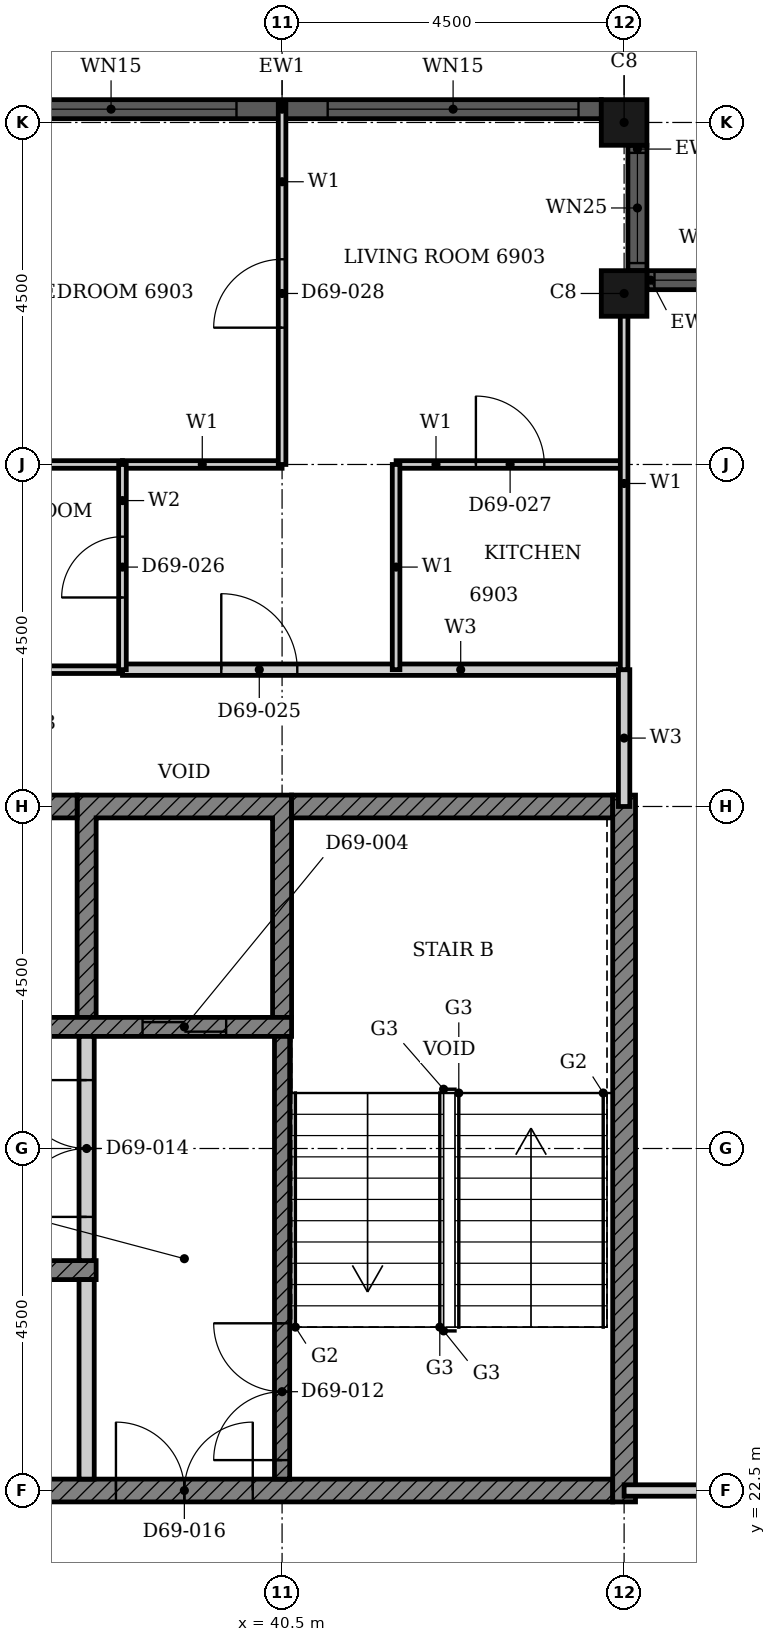
"""IFC4 building model, lengths in metres.
Left out: names, types, materials, properties, quantities, classifications, styles, units other than length and angle.
Written with IfcOpenShell. Run it as: python <this file> out.ifc"""

import sys

from ifc_helpers import new_model, si_unit, direction, frame, frame_2d, origin, origin_2d, place, context, subcontext, project, spatial, polyline, rectangle, hollow_rectangle, outline, extrude, element, fill, save


model = new_model("IFC4")
c1 = context("Model", 3, precision=1e-05, world=origin(), true_north=direction((0.0, 1.0)))
c2 = subcontext(c1, "Body", "Model", "MODEL_VIEW")
j1 = project(units=[si_unit("LENGTHUNIT", "METRE"), si_unit("PLANEANGLEUNIT", "RADIAN")], contexts=[c1])
p1 = place(None, origin())
s1 = spatial("IfcSite", under=j1, at=p1, CompositionType="ELEMENT")
p2 = place(p1, origin())
s2 = spatial("IfcBuilding", under=s1, at=p2, CompositionType="ELEMENT")
p3 = place(p2, frame((0.0, 0.0, 271.2)))
s3 = spatial("IfcBuildingStorey", under=s2, at=p3, CompositionType="ELEMENT", Elevation=271.2)
for number, where, z_axis, x_axis in (
    (1, (45.0, 38.25, 0.0), (0.0, 0.0, 1.0), (1.0, 0.0, 0.0)),
    (2, (45.0, 40.5, 0.0), (0.0, 0.0, 1.0), (1.0, 0.0, 0.0)),
):
    element("IfcColumn", number, at=place(p3, frame(where, z_axis=z_axis, x_axis=x_axis)), inside=s3, PredefinedType="COLUMN", context=c2, shape_type="SweptSolid", body=[
        extrude(hollow_rectangle(XDim=0.6, YDim=0.6, WallThickness=0.02, at=origin_2d()), origin(), (0.0, 0.0, 1.0), 3.7),
    ])
p4 = place(p3, frame((46.95, 38.425, 0.0), z_axis=(0.0, 0.0, 1.0), x_axis=(-1.0, 0.0, 0.0)))
e3 = element("IfcWall", 3, at=p4, inside=s3, PredefinedType="SOLIDWALL", context=c2, shape_type="SweptSolid", body=[
    extrude(rectangle(XDim=1.65, YDim=0.25, at=frame_2d((0.825, 0.0))), origin(), (0.0, 0.0, 1.0), 3.7),
])
p5 = place(p4, frame((0.1, 0.0, 0.9)))
e4 = element("IfcOpeningElement", 4, at=p5, cuts=e3, PredefinedType="OPENING", context=c2, shape_type="SweptSolid", body=[
    extrude(rectangle(XDim=1.45, YDim=1.85, at=frame_2d((0.725, 0.925))), frame((0.0, 0.135, 0.0), z_axis=(0.0, -1.0, 0.0), x_axis=(1.0, 0.0, 0.0)), (0.0, 0.0, 1.0), 0.27),
])
p6 = place(p3, frame((45.175, 38.55, 0.0), z_axis=(0.0, 0.0, 1.0), x_axis=(0.0, 1.0, 0.0)))
e5 = element("IfcWall", 5, at=p6, inside=s3, PredefinedType="SOLIDWALL", context=c2, shape_type="SweptSolid", body=[
    extrude(rectangle(XDim=1.65, YDim=0.25, at=frame_2d((0.825, 0.0))), origin(), (0.0, 0.0, 1.0), 3.7),
])
p7 = place(p6, frame((0.1, 0.0, 0.9)))
e6 = element("IfcOpeningElement", 6, at=p7, cuts=e5, PredefinedType="OPENING", context=c2, shape_type="SweptSolid", body=[
    extrude(rectangle(XDim=1.45, YDim=1.85, at=frame_2d((0.725, 0.925))), frame((0.0, 0.135, 0.0), z_axis=(0.0, -1.0, 0.0), x_axis=(1.0, 0.0, 0.0)), (0.0, 0.0, 1.0), 0.27),
])
p8 = place(p3, frame((44.7, 40.675, 0.0), z_axis=(0.0, 0.0, 1.0), x_axis=(-1.0, 0.0, 0.0)))
e7 = element("IfcWall", 7, at=p8, inside=s3, PredefinedType="SOLIDWALL", context=c2, shape_type="SweptSolid", body=[
    extrude(rectangle(XDim=8.4, YDim=0.25, at=frame_2d((4.2, 0.0))), origin(), (0.0, 0.0, 1.0), 3.7),
])
p9 = place(p8, frame((0.3, 0.0, 0.45)))
e8 = element("IfcOpeningElement", 8, at=p9, cuts=e7, PredefinedType="OPENING", context=c2, shape_type="SweptSolid", body=[
    extrude(rectangle(XDim=3.3, YDim=2.3, at=frame_2d((1.65, 1.15))), frame((0.0, 0.135, 0.0), z_axis=(0.0, -1.0, 0.0), x_axis=(1.0, 0.0, 0.0)), (0.0, 0.0, 1.0), 0.27),
])
p10 = place(p8, frame((4.8, 0.0, 0.45)))
e9 = element("IfcOpeningElement", 9, at=p10, cuts=e7, PredefinedType="OPENING", context=c2, shape_type="SweptSolid", body=[
    extrude(rectangle(XDim=3.3, YDim=2.3, at=frame_2d((1.65, 1.15))), frame((0.0, 0.135, 0.0), z_axis=(0.0, -1.0, 0.0), x_axis=(1.0, 0.0, 0.0)), (0.0, 0.0, 1.0), 0.27),
])
p11 = place(p3, origin())
e10 = element("IfcWall", 10, at=p11, inside=s3, PredefinedType="SHEAR", context=c2, shape_type="SweptSolid", body=[
    extrude(outline(polyline([(37.803, 28.725), (38.053, 28.725), (38.053, 31.35), (40.375, 31.35), (40.375, 28.725), (40.625, 28.725), (40.625, 31.65), (37.803, 31.65), (37.803, 28.725)])), origin(), (0.0, 0.0, 1.0), 3.4),
])
p12 = place(p3, frame((30.339, 22.5, 0.0), z_axis=(0.0, 0.0, 1.0), x_axis=(1.0, 0.0, 0.0)))
e11 = element("IfcWall", 11, at=p12, inside=s3, PredefinedType="SHEAR", context=c2, shape_type="SweptSolid", body=[
    extrude(rectangle(XDim=14.511, YDim=0.3, at=frame_2d((7.255, 0.0))), origin(), (0.0, 0.0, 1.0), 3.4),
])
p13 = place(p12, frame((7.975, 0.0, 0.0)))
e12 = element("IfcOpeningElement", 12, at=p13, cuts=e11, PredefinedType="OPENING", context=c2, shape_type="SweptSolid", body=[
    extrude(rectangle(XDim=1.8, YDim=2.1, at=frame_2d((0.9, 1.05))), frame((0.0, 0.16, 0.0), z_axis=(0.0, -1.0, 0.0), x_axis=(1.0, 0.0, 0.0)), (0.0, 0.0, 1.0), 0.32),
])
p14 = place(p3, frame((30.339, 31.5, 0.0), z_axis=(0.0, 0.0, 1.0), x_axis=(1.0, 0.0, 0.0)))
e13 = element("IfcWall", 13, at=p14, inside=s3, PredefinedType="SHEAR", context=c2, shape_type="SweptSolid", body=[
    extrude(rectangle(XDim=7.464, YDim=0.3, at=frame_2d((3.732, 0.0))), origin(), (0.0, 0.0, 1.0), 3.4),
])
p15 = place(p3, frame((40.625, 31.5, 0.0), z_axis=(0.0, 0.0, 1.0), x_axis=(1.0, 0.0, 0.0)))
e14 = element("IfcWall", 14, at=p15, inside=s3, PredefinedType="SHEAR", context=c2, shape_type="SweptSolid", body=[
    extrude(rectangle(XDim=4.225, YDim=0.3, at=frame_2d((2.113, 0.0))), origin(), (0.0, 0.0, 1.0), 3.4),
])
p16 = place(p3, frame((45.0, 22.35, 0.0), z_axis=(0.0, 0.0, 1.0), x_axis=(0.0, 1.0, 0.0)))
e15 = element("IfcWall", 15, at=p16, inside=s3, PredefinedType="SHEAR", context=c2, shape_type="SweptSolid", body=[
    extrude(rectangle(XDim=9.3, YDim=0.3, at=frame_2d((4.65, 0.0))), origin(), (0.0, 0.0, 1.0), 3.4),
])
p17 = place(p3, frame((22.375, 25.4, 0.0), z_axis=(0.0, 0.0, 1.0), x_axis=(1.0, 0.0, 0.0)))
e16 = element("IfcWall", 16, at=p17, inside=s3, PredefinedType="SHEAR", context=c2, shape_type="SweptSolid", body=[
    extrude(rectangle(XDim=15.678, YDim=0.25, at=frame_2d((7.839, 0.0))), origin(), (0.0, 0.0, 1.0), 3.4),
])
p18 = place(p17, frame((6.004, 0.0, 0.0)))
e17 = element("IfcOpeningElement", 17, at=p18, cuts=e16, PredefinedType="OPENING", context=c2, shape_type="SweptSolid", body=[
    extrude(rectangle(XDim=1.1, YDim=2.1, at=frame_2d((0.55, 1.05))), frame((0.0, 0.135, 0.0), z_axis=(0.0, -1.0, 0.0), x_axis=(1.0, 0.0, 0.0)), (0.0, 0.0, 1.0), 0.27),
])
p19 = place(p17, frame((0.861, 0.0, 0.0)))
e18 = element("IfcOpeningElement", 18, at=p19, cuts=e16, PredefinedType="OPENING", context=c2, shape_type="SweptSolid", body=[
    extrude(rectangle(XDim=1.1, YDim=2.1, at=frame_2d((0.55, 1.05))), frame((0.0, 0.135, 0.0), z_axis=(0.0, -1.0, 0.0), x_axis=(1.0, 0.0, 0.0)), (0.0, 0.0, 1.0), 0.27),
])
p20 = place(p17, frame((3.532, 0.0, 0.0)))
e19 = element("IfcOpeningElement", 19, at=p20, cuts=e16, PredefinedType="OPENING", context=c2, shape_type="SweptSolid", body=[
    extrude(rectangle(XDim=0.9, YDim=2.1, at=frame_2d((0.45, 1.05))), frame((0.0, 0.135, 0.0), z_axis=(0.0, -1.0, 0.0), x_axis=(1.0, 0.0, 0.0)), (0.0, 0.0, 1.0), 0.27),
])
p21 = place(p17, frame((8.675, 0.0, 0.0)))
e20 = element("IfcOpeningElement", 20, at=p21, cuts=e16, PredefinedType="OPENING", context=c2, shape_type="SweptSolid", body=[
    extrude(rectangle(XDim=0.9, YDim=2.1, at=frame_2d((0.45, 1.05))), frame((0.0, 0.135, 0.0), z_axis=(0.0, -1.0, 0.0), x_axis=(1.0, 0.0, 0.0)), (0.0, 0.0, 1.0), 0.27),
])
p22 = place(p17, frame((11.246, 0.0, 0.0)))
e21 = element("IfcOpeningElement", 21, at=p22, cuts=e16, PredefinedType="OPENING", context=c2, shape_type="SweptSolid", body=[
    extrude(rectangle(XDim=0.9, YDim=2.1, at=frame_2d((0.45, 1.05))), frame((0.0, 0.135, 0.0), z_axis=(0.0, -1.0, 0.0), x_axis=(1.0, 0.0, 0.0)), (0.0, 0.0, 1.0), 0.27),
])
p23 = place(p17, frame((13.818, 0.0, 0.0)))
e22 = element("IfcOpeningElement", 22, at=p23, cuts=e16, PredefinedType="OPENING", context=c2, shape_type="SweptSolid", body=[
    extrude(rectangle(XDim=0.9, YDim=2.1, at=frame_2d((0.45, 1.05))), frame((0.0, 0.135, 0.0), z_axis=(0.0, -1.0, 0.0), x_axis=(1.0, 0.0, 0.0)), (0.0, 0.0, 1.0), 0.27),
])
p24 = place(p3, frame((24.947, 28.6, 0.0), z_axis=(0.0, 0.0, 1.0), x_axis=(1.0, 0.0, 0.0)))
e23 = element("IfcWall", 23, at=p24, inside=s3, PredefinedType="SHEAR", context=c2, shape_type="SweptSolid", body=[
    extrude(rectangle(XDim=15.678, YDim=0.25, at=frame_2d((7.839, 0.0))), origin(), (0.0, 0.0, 1.0), 3.4),
])
p25 = place(p24, frame((3.432, 0.0, 0.0)))
e24 = element("IfcOpeningElement", 24, at=p25, cuts=e23, PredefinedType="OPENING", context=c2, shape_type="SweptSolid", body=[
    extrude(rectangle(XDim=1.1, YDim=2.1, at=frame_2d((0.55, 1.05))), frame((0.0, 0.135, 0.0), z_axis=(0.0, -1.0, 0.0), x_axis=(1.0, 0.0, 0.0)), (0.0, 0.0, 1.0), 0.27),
])
p26 = place(p24, frame((13.718, 0.0, 0.0)))
e25 = element("IfcOpeningElement", 25, at=p26, cuts=e23, PredefinedType="OPENING", context=c2, shape_type="SweptSolid", body=[
    extrude(rectangle(XDim=1.1, YDim=2.1, at=frame_2d((0.55, 1.05))), frame((0.0, 0.135, 0.0), z_axis=(0.0, -1.0, 0.0), x_axis=(1.0, 0.0, 0.0)), (0.0, 0.0, 1.0), 0.27),
])
p27 = place(p24, frame((0.961, 0.0, 0.0)))
e26 = element("IfcOpeningElement", 26, at=p27, cuts=e23, PredefinedType="OPENING", context=c2, shape_type="SweptSolid", body=[
    extrude(rectangle(XDim=0.9, YDim=2.1, at=frame_2d((0.45, 1.05))), frame((0.0, 0.135, 0.0), z_axis=(0.0, -1.0, 0.0), x_axis=(1.0, 0.0, 0.0)), (0.0, 0.0, 1.0), 0.27),
])
p28 = place(p24, frame((8.675, 0.0, 0.0)))
e27 = element("IfcOpeningElement", 27, at=p28, cuts=e23, PredefinedType="OPENING", context=c2, shape_type="SweptSolid", body=[
    extrude(rectangle(XDim=0.9, YDim=2.1, at=frame_2d((0.45, 1.05))), frame((0.0, 0.135, 0.0), z_axis=(0.0, -1.0, 0.0), x_axis=(1.0, 0.0, 0.0)), (0.0, 0.0, 1.0), 0.27),
])
p29 = place(p3, frame((37.928, 22.65, 0.0), z_axis=(0.0, 0.0, 1.0), x_axis=(0.0, 1.0, 0.0)))
e28 = element("IfcWall", 28, at=p29, inside=s3, PredefinedType="PARTITIONING", context=c2, shape_type="SweptSolid", body=[
    extrude(rectangle(XDim=2.625, YDim=0.2, at=frame_2d((1.312, 0.0))), origin(), (0.0, 0.0, 1.0), 3.4),
])
p30 = place(p3, frame((40.5, 22.65, 0.0), z_axis=(0.0, 0.0, 1.0), x_axis=(0.0, 1.0, 0.0)))
e29 = element("IfcWall", 29, at=p30, inside=s3, PredefinedType="SHEAR", context=c2, shape_type="SweptSolid", body=[
    extrude(rectangle(XDim=5.825, YDim=0.2, at=frame_2d((2.913, 0.0))), origin(), (0.0, 0.0, 1.0), 3.4),
])
p31 = place(p30, frame((0.25, 0.0, 0.0)))
e30 = element("IfcOpeningElement", 30, at=p31, cuts=e29, PredefinedType="OPENING", context=c2, shape_type="SweptSolid", body=[
    extrude(rectangle(XDim=1.8, YDim=2.1, at=frame_2d((0.9, 1.05))), frame((0.0, 0.11, 0.0), z_axis=(0.0, -1.0, 0.0), x_axis=(1.0, 0.0, 0.0)), (0.0, 0.0, 1.0), 0.22),
])
p32 = place(p3, frame((37.928, 25.525, 0.0), z_axis=(0.0, 0.0, 1.0), x_axis=(0.0, 1.0, 0.0)))
e31 = element("IfcWall", 31, at=p32, inside=s3, PredefinedType="PARTITIONING", context=c2, shape_type="SweptSolid", body=[
    extrude(rectangle(XDim=2.95, YDim=0.2, at=frame_2d((1.475, 0.0))), origin(), (0.0, 0.0, 1.0), 3.4),
])
p33 = place(p32, frame((0.575, 0.0, 0.0)))
e32 = element("IfcOpeningElement", 32, at=p33, cuts=e31, PredefinedType="OPENING", context=c2, shape_type="SweptSolid", body=[
    extrude(rectangle(XDim=1.8, YDim=2.1, at=frame_2d((0.9, 1.05))), frame((0.0, 0.11, 0.0), z_axis=(0.0, -1.0, 0.0), x_axis=(1.0, 0.0, 0.0)), (0.0, 0.0, 1.0), 0.22),
])
p34 = place(p3, frame((45.0, 22.5, 0.0), z_axis=(0.0, 0.0, 1.0), x_axis=(1.0, 0.0, 0.0)))
e33 = element("IfcWall", 33, at=p34, inside=s3, PredefinedType="PARTITIONING", context=c2, shape_type="SweptSolid", body=[
    extrude(rectangle(XDim=4.74, YDim=0.15, at=frame_2d((2.37, 0.0))), origin(), (0.0, 0.0, 1.0), 3.4),
])
p35 = place(p34, frame((1.75, 0.0, 0.0)))
e34 = element("IfcOpeningElement", 34, at=p35, cuts=e33, PredefinedType="OPENING", context=c2, shape_type="SweptSolid", body=[
    extrude(rectangle(XDim=1.0, YDim=2.1, at=frame_2d((0.5, 1.05))), frame((0.0, 0.085, 0.0), z_axis=(0.0, -1.0, 0.0), x_axis=(1.0, 0.0, 0.0)), (0.0, 0.0, 1.0), 0.17),
])
p36 = place(p3, frame((38.4, 33.3, 0.0), z_axis=(0.0, 0.0, 1.0), x_axis=(1.0, 0.0, 0.0)))
e35 = element("IfcWall", 35, at=p36, inside=s3, PredefinedType="PARTITIONING", context=c2, shape_type="SweptSolid", body=[
    extrude(rectangle(XDim=6.6, YDim=0.15, at=frame_2d((3.3, 0.0))), origin(), (0.0, 0.0, 1.0), 3.4),
])
p37 = place(p36, frame((1.3, 0.0, 0.0)))
e36 = element("IfcOpeningElement", 36, at=p37, cuts=e35, PredefinedType="OPENING", context=c2, shape_type="SweptSolid", body=[
    extrude(rectangle(XDim=1.0, YDim=2.2, at=frame_2d((0.5, 1.1))), frame((0.0, 0.085, 0.0), z_axis=(0.0, -1.0, 0.0), x_axis=(1.0, 0.0, 0.0)), (0.0, 0.0, 1.0), 0.17),
])
p38 = place(p3, frame((45.0, 31.5, 0.0), z_axis=(0.0, 0.0, 1.0), x_axis=(0.0, 1.0, 0.0)))
e37 = element("IfcWall", 37, at=p38, inside=s3, PredefinedType="PARTITIONING", context=c2, shape_type="SweptSolid", body=[
    extrude(rectangle(XDim=1.8, YDim=0.15, at=frame_2d((0.9, 0.0))), origin(), (0.0, 0.0, 1.0), 3.4),
])
p39 = place(p3, frame((38.4, 36.0, 0.0), z_axis=(0.0, 0.0, 1.0), x_axis=(1.0, 0.0, 0.0)))
e38 = element("IfcWall", 38, at=p39, inside=s3, PredefinedType="PARTITIONING", context=c2, shape_type="SweptSolid", body=[
    extrude(rectangle(XDim=2.1, YDim=0.1, at=frame_2d((1.05, 0.0))), origin(), (0.0, 0.0, 1.0), 3.4),
])
p40 = place(p3, frame((42.0, 36.0, 0.0), z_axis=(0.0, 0.0, 1.0), x_axis=(1.0, 0.0, 0.0)))
e39 = element("IfcWall", 39, at=p40, inside=s3, PredefinedType="PARTITIONING", context=c2, shape_type="SweptSolid", body=[
    extrude(rectangle(XDim=3.0, YDim=0.1, at=frame_2d((1.5, 0.0))), origin(), (0.0, 0.0, 1.0), 3.4),
])
p41 = place(p40, frame((1.05, 0.0, 0.0)))
e40 = element("IfcOpeningElement", 40, at=p41, cuts=e39, PredefinedType="OPENING", context=c2, shape_type="SweptSolid", body=[
    extrude(rectangle(XDim=0.9, YDim=2.1, at=frame_2d((0.45, 1.05))), frame((0.0, 0.06, 0.0), z_axis=(0.0, -1.0, 0.0), x_axis=(1.0, 0.0, 0.0)), (0.0, 0.0, 1.0), 0.12),
])
p42 = place(p3, frame((40.5, 36.0, 0.0), z_axis=(0.0, 0.0, 1.0), x_axis=(0.0, 1.0, 0.0)))
e41 = element("IfcWall", 41, at=p42, inside=s3, PredefinedType="PARTITIONING", context=c2, shape_type="SweptSolid", body=[
    extrude(rectangle(XDim=4.74, YDim=0.1, at=frame_2d((2.37, 0.0))), origin(), (0.0, 0.0, 1.0), 3.4),
])
p43 = place(p42, frame((1.8, 0.0, 0.0)))
e42 = element("IfcOpeningElement", 42, at=p43, cuts=e41, PredefinedType="OPENING", context=c2, shape_type="SweptSolid", body=[
    extrude(rectangle(XDim=0.9, YDim=2.1, at=frame_2d((0.45, 1.05))), frame((0.0, 0.06, 0.0), z_axis=(0.0, -1.0, 0.0), x_axis=(1.0, 0.0, 0.0)), (0.0, 0.0, 1.0), 0.12),
])
p44 = place(p3, frame((42.0, 33.3, 0.0), z_axis=(0.0, 0.0, 1.0), x_axis=(0.0, 1.0, 0.0)))
e43 = element("IfcWall", 43, at=p44, inside=s3, PredefinedType="PARTITIONING", context=c2, shape_type="SweptSolid", body=[
    extrude(rectangle(XDim=2.7, YDim=0.1, at=frame_2d((1.35, 0.0))), origin(), (0.0, 0.0, 1.0), 3.4),
])
p45 = place(p3, frame((45.0, 33.3, 0.0), z_axis=(0.0, 0.0, 1.0), x_axis=(0.0, 1.0, 0.0)))
e44 = element("IfcWall", 44, at=p45, inside=s3, PredefinedType="PARTITIONING", context=c2, shape_type="SweptSolid", body=[
    extrude(rectangle(XDim=4.9, YDim=0.1, at=frame_2d((2.45, 0.0))), origin(), (0.0, 0.0, 1.0), 3.4),
])
for number, where, z_axis, x_axis in (
    (45, (36.0, 33.3, 0.0), (0.0, 0.0, 1.0), (1.0, 0.0, 0.0)),
    (46, (36.0, 36.0, 0.0), (0.0, 0.0, 1.0), (1.0, 0.0, 0.0)),
):
    element("IfcWall", number, at=place(p3, frame(where, z_axis=z_axis, x_axis=x_axis)), inside=s3, PredefinedType="PARTITIONING", context=c2, shape_type="SweptSolid", body=[
        extrude(rectangle(XDim=2.4, YDim=0.1, at=frame_2d((1.2, 0.0))), origin(), (0.0, 0.0, 1.0), 3.4),
    ])
p46 = place(p3, frame((38.4, 33.3, 0.0), z_axis=(0.0, 0.0, 1.0), x_axis=(0.0, 1.0, 0.0)))
e47 = element("IfcWall", 47, at=p46, inside=s3, PredefinedType="PARTITIONING", context=c2, shape_type="SweptSolid", body=[
    extrude(rectangle(XDim=2.7, YDim=0.1, at=frame_2d((1.35, 0.0))), origin(), (0.0, 0.0, 1.0), 3.4),
])
p47 = place(p46, frame((0.95, 0.0, 0.0)))
e48 = element("IfcOpeningElement", 48, at=p47, cuts=e47, PredefinedType="OPENING", context=c2, shape_type="SweptSolid", body=[
    extrude(rectangle(XDim=0.8, YDim=2.1, at=frame_2d((0.4, 1.05))), frame((0.0, 0.06, 0.0), z_axis=(0.0, -1.0, 0.0), x_axis=(1.0, 0.0, 0.0)), (0.0, 0.0, 1.0), 0.12),
])
p48 = place(p5, origin())
e49 = element("IfcWindow", 49, at=p48, inside=s3, PartitioningType="SINGLE_PANEL", PredefinedType="WINDOW", context=c2, shape_type="SweptSolid", body=[
    extrude(rectangle(XDim=1.45, YDim=1.85, at=frame_2d((0.725, 0.925))), frame((0.0, 0.03, 0.0), z_axis=(0.0, -1.0, 0.0), x_axis=(1.0, 0.0, 0.0)), (0.0, 0.0, 1.0), 0.06),
])
fill(e4, e49)
p49 = place(p7, origin())
e50 = element("IfcWindow", 50, at=p49, inside=s3, PartitioningType="SINGLE_PANEL", PredefinedType="WINDOW", context=c2, shape_type="SweptSolid", body=[
    extrude(rectangle(XDim=1.45, YDim=1.85, at=frame_2d((0.725, 0.925))), frame((0.0, 0.03, 0.0), z_axis=(0.0, -1.0, 0.0), x_axis=(1.0, 0.0, 0.0)), (0.0, 0.0, 1.0), 0.06),
])
fill(e6, e50)
p50 = place(p9, origin())
e51 = element("IfcWindow", 51, at=p50, inside=s3, PartitioningType="SINGLE_PANEL", PredefinedType="WINDOW", context=c2, shape_type="SweptSolid", body=[
    extrude(rectangle(XDim=3.3, YDim=2.3, at=frame_2d((1.65, 1.15))), frame((0.0, 0.03, 0.0), z_axis=(0.0, -1.0, 0.0), x_axis=(1.0, 0.0, 0.0)), (0.0, 0.0, 1.0), 0.06),
])
fill(e8, e51)
p51 = place(p10, origin())
e52 = element("IfcWindow", 52, at=p51, inside=s3, PartitioningType="SINGLE_PANEL", PredefinedType="WINDOW", context=c2, shape_type="SweptSolid", body=[
    extrude(rectangle(XDim=3.3, YDim=2.3, at=frame_2d((1.65, 1.15))), frame((0.0, 0.03, 0.0), z_axis=(0.0, -1.0, 0.0), x_axis=(1.0, 0.0, 0.0)), (0.0, 0.0, 1.0), 0.06),
])
fill(e9, e52)
p52 = place(p26, origin())
e53 = element("IfcDoor", 53, at=p52, inside=s3, OperationType="DOUBLE_DOOR_SLIDING", PredefinedType="DOOR", context=c2, shape_type="SweptSolid", body=[
    extrude(rectangle(XDim=1.1, YDim=2.1, at=frame_2d((0.55, 1.05))), frame((0.0, 0.025, 0.0), z_axis=(0.0, -1.0, 0.0), x_axis=(1.0, 0.0, 0.0)), (0.0, 0.0, 1.0), 0.05),
])
fill(e25, e53)
p53 = place(p31, origin())
e54 = element("IfcDoor", 54, at=p53, inside=s3, OperationType="DOUBLE_DOOR_SINGLE_SWING", PredefinedType="DOOR", context=c2, shape_type="SweptSolid", body=[
    extrude(rectangle(XDim=1.8, YDim=2.1, at=frame_2d((0.9, 1.05))), frame((0.0, 0.025, 0.0), z_axis=(0.0, -1.0, 0.0), x_axis=(1.0, 0.0, 0.0)), (0.0, 0.0, 1.0), 0.05),
])
fill(e30, e54)
p54 = place(p33, origin())
e55 = element("IfcDoor", 55, at=p54, inside=s3, OperationType="DOUBLE_DOOR_SINGLE_SWING", PredefinedType="DOOR", context=c2, shape_type="SweptSolid", body=[
    extrude(rectangle(XDim=1.8, YDim=2.1, at=frame_2d((0.9, 1.05))), frame((0.0, 0.025, 0.0), z_axis=(0.0, -1.0, 0.0), x_axis=(1.0, 0.0, 0.0)), (0.0, 0.0, 1.0), 0.05),
])
fill(e32, e55)
p55 = place(p13, origin())
e56 = element("IfcDoor", 56, at=p55, inside=s3, OperationType="DOUBLE_DOOR_SINGLE_SWING", PredefinedType="DOOR", context=c2, shape_type="SweptSolid", body=[
    extrude(rectangle(XDim=1.8, YDim=2.1, at=frame_2d((0.9, 1.05))), frame((0.0, 0.025, 0.0), z_axis=(0.0, -1.0, 0.0), x_axis=(1.0, 0.0, 0.0)), (0.0, 0.0, 1.0), 0.05),
])
fill(e12, e56)
p56 = place(p37, origin())
e57 = element("IfcDoor", 57, at=p56, inside=s3, OperationType="SINGLE_SWING_LEFT", PredefinedType="DOOR", context=c2, shape_type="SweptSolid", body=[
    extrude(rectangle(XDim=1.0, YDim=2.2, at=frame_2d((0.5, 1.1))), frame((0.0, 0.025, 0.0), z_axis=(0.0, -1.0, 0.0), x_axis=(1.0, 0.0, 0.0)), (0.0, 0.0, 1.0), 0.05),
])
fill(e36, e57)
p57 = place(p47, origin())
e58 = element("IfcDoor", 58, at=p57, inside=s3, OperationType="SINGLE_SWING_RIGHT", PredefinedType="DOOR", context=c2, shape_type="SweptSolid", body=[
    extrude(rectangle(XDim=0.8, YDim=2.1, at=frame_2d((0.4, 1.05))), frame((0.0, 0.025, 0.0), z_axis=(0.0, -1.0, 0.0), x_axis=(1.0, 0.0, 0.0)), (0.0, 0.0, 1.0), 0.05),
])
fill(e48, e58)
p58 = place(p41, origin())
e59 = element("IfcDoor", 59, at=p58, inside=s3, OperationType="SINGLE_SWING_LEFT", PredefinedType="DOOR", context=c2, shape_type="SweptSolid", body=[
    extrude(rectangle(XDim=0.9, YDim=2.1, at=frame_2d((0.45, 1.05))), frame((0.0, 0.025, 0.0), z_axis=(0.0, -1.0, 0.0), x_axis=(1.0, 0.0, 0.0)), (0.0, 0.0, 1.0), 0.05),
])
fill(e40, e59)
p59 = place(p43, origin())
e60 = element("IfcDoor", 60, at=p59, inside=s3, OperationType="SINGLE_SWING_RIGHT", PredefinedType="DOOR", context=c2, shape_type="SweptSolid", body=[
    extrude(rectangle(XDim=0.9, YDim=2.1, at=frame_2d((0.45, 1.05))), frame((0.0, 0.025, 0.0), z_axis=(0.0, -1.0, 0.0), x_axis=(1.0, 0.0, 0.0)), (0.0, 0.0, 1.0), 0.05),
])
fill(e42, e60)
save(model, sys.argv[1])
